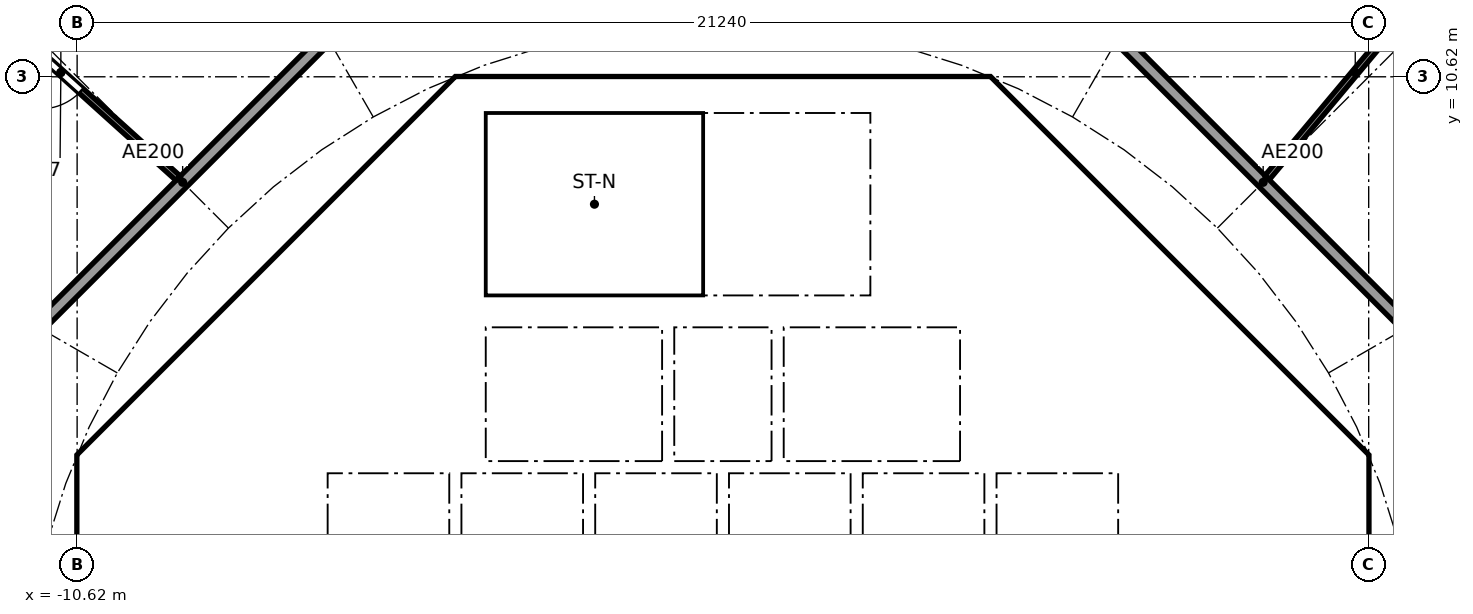
"""IFC4 building model, lengths in metres.
Left out: names, types, materials, properties, quantities, classifications, styles, units other than length and angle.
Written with IfcOpenShell. Run it as: python <this file> out.ifc"""

import sys

from ifc_helpers import new_model, si_unit, direction, frame, frame_2d, origin, place, context, subcontext, project, spatial, polyline, rectangle, outline, extrude, element, fill, save


model = new_model("IFC4")
c1 = context("Model", 3, precision=1e-05, world=origin(), true_north=direction((0.0, 1.0)))
c2 = subcontext(c1, "Body", "Model", "MODEL_VIEW")
j1 = project(units=[si_unit("LENGTHUNIT", "METRE"), si_unit("PLANEANGLEUNIT", "RADIAN")], contexts=[c1])
p1 = place(None, origin())
s1 = spatial("IfcSite", under=j1, at=p1, CompositionType="ELEMENT")
p2 = place(p1, origin())
s2 = spatial("IfcBuilding", under=s1, at=p2, CompositionType="ELEMENT")
p3 = place(p2, frame((0.0, 0.0, 91.8)))
s3 = spatial("IfcBuildingStorey", under=s2, at=p3, CompositionType="ELEMENT", Elevation=91.8)
p4 = place(p3, frame((9.988, 4.613, 0.0), z_axis=(0.0, 0.0, 1.0), x_axis=(-0.707106781187, 0.707106781187, 0.0)))
e1 = element("IfcWall", 1, at=p4, inside=s3, PredefinedType="SHEAR", context=c2, shape_type="SweptSolid", body=[
    extrude(rectangle(XDim=7.602, YDim=0.6, at=frame_2d((3.801, 0.0))), origin(), (0.0, 0.0, 1.0), 3.44),
])
p5 = place(p4, frame((3.201, 0.0, 0.0)))
e2 = element("IfcOpeningElement", 2, at=p5, cuts=e1, PredefinedType="OPENING", context=c2, shape_type="SweptSolid", body=[
    extrude(rectangle(XDim=1.2, YDim=2.1, at=frame_2d((0.6, 1.05))), frame((0.0, 0.31, 0.0), z_axis=(0.0, -1.0, 0.0), x_axis=(1.0, 0.0, 0.0)), (0.0, 0.0, 1.0), 0.62),
])
p6 = place(p3, frame((-4.613, 9.988, 0.0), z_axis=(0.0, 0.0, 1.0), x_axis=(-0.707106781187, -0.707106781187, 0.0)))
e3 = element("IfcWall", 3, at=p6, inside=s3, PredefinedType="SHEAR", context=c2, shape_type="SweptSolid", body=[
    extrude(rectangle(XDim=7.602, YDim=0.6, at=frame_2d((3.801, 0.0))), origin(), (0.0, 0.0, 1.0), 3.44),
])
p7 = place(p6, frame((0.351, 0.0, 0.0)))
e4 = element("IfcOpeningElement", 4, at=p7, cuts=e3, PredefinedType="OPENING", context=c2, shape_type="SweptSolid", body=[
    extrude(rectangle(XDim=1.1, YDim=2.1, at=frame_2d((0.55, 1.05))), frame((0.0, 0.31, 0.0), z_axis=(0.0, -1.0, 0.0), x_axis=(1.0, 0.0, 0.0)), (0.0, 0.0, 1.0), 0.62),
])
p8 = place(p3, frame((-10.325, 3.801, 0.0), z_axis=(0.0, 0.0, 1.0), x_axis=(0.0, -1.0, 0.0)))
e5 = element("IfcWall", 5, at=p8, inside=s3, PredefinedType="SHEAR", context=c2, shape_type="SweptSolid", body=[
    extrude(rectangle(XDim=7.602, YDim=0.6, at=frame_2d((3.801, 0.0))), origin(), (0.0, 0.0, 1.0), 3.44),
])
p9 = place(p8, frame((0.651, 0.0, 0.0)))
e6 = element("IfcOpeningElement", 6, at=p9, cuts=e5, PredefinedType="OPENING", context=c2, shape_type="SweptSolid", body=[
    extrude(rectangle(XDim=1.5, YDim=2.1, at=frame_2d((0.75, 1.05))), frame((0.0, 0.31, 0.0), z_axis=(0.0, -1.0, 0.0), x_axis=(1.0, 0.0, 0.0)), (0.0, 0.0, 1.0), 0.62),
])
p10 = place(p8, frame((5.451, 0.0, 0.0)))
e7 = element("IfcOpeningElement", 7, at=p10, cuts=e5, PredefinedType="OPENING", context=c2, shape_type="SweptSolid", body=[
    extrude(rectangle(XDim=1.5, YDim=2.1, at=frame_2d((0.75, 1.05))), frame((0.0, 0.31, 0.0), z_axis=(0.0, -1.0, 0.0), x_axis=(1.0, 0.0, 0.0)), (0.0, 0.0, 1.0), 0.62),
])
p11 = place(p3, frame((-7.0, 4.1, 0.0), z_axis=(0.0, 0.0, 1.0), x_axis=(0.0, 1.0, 0.0)))
e8 = element("IfcWall", 8, at=p11, inside=s3, PredefinedType="PARTITIONING", context=c2, shape_type="SweptSolid", body=[
    extrude(rectangle(XDim=2.927, YDim=0.15, at=frame_2d((1.463, 0.0))), origin(), (0.0, 0.0, 1.0), 3.44),
])
p12 = place(p11, frame((1.051, 0.0, 0.0)))
e9 = element("IfcOpeningElement", 9, at=p12, cuts=e8, PredefinedType="OPENING", context=c2, shape_type="SweptSolid", body=[
    extrude(rectangle(XDim=0.9, YDim=2.1, at=frame_2d((0.45, 1.05))), frame((0.0, 0.085, 0.0), z_axis=(0.0, -1.0, 0.0), x_axis=(1.0, 0.0, 0.0)), (0.0, 0.0, 1.0), 0.17),
])
p13 = place(p3, frame((4.0, 4.3, 0.0), z_axis=(0.0, 0.0, 1.0), x_axis=(0.0, 1.0, 0.0)))
e10 = element("IfcWall", 10, at=p13, inside=s3, PredefinedType="SOLIDWALL", context=c2, shape_type="SweptSolid", body=[
    extrude(rectangle(XDim=2.2, YDim=0.2, at=frame_2d((1.1, 0.0))), origin(), (0.0, 0.0, 1.0), 3.44),
])
p14 = place(p13, frame((0.55, 0.0, 0.0)))
e11 = element("IfcOpeningElement", 11, at=p14, cuts=e10, PredefinedType="OPENING", context=c2, shape_type="SweptSolid", body=[
    extrude(rectangle(XDim=1.1, YDim=2.1, at=frame_2d((0.55, 1.05))), frame((0.0, 0.11, 0.0), z_axis=(0.0, -1.0, 0.0), x_axis=(1.0, 0.0, 0.0)), (0.0, 0.0, 1.0), 0.22),
])
p15 = place(p3, frame((-4.0, 4.3, 0.0), z_axis=(0.0, 0.0, 1.0), x_axis=(0.0, 1.0, 0.0)))
e12 = element("IfcWall", 12, at=p15, inside=s3, PredefinedType="SOLIDWALL", context=c2, shape_type="SweptSolid", body=[
    extrude(rectangle(XDim=2.2, YDim=0.2, at=frame_2d((1.1, 0.0))), origin(), (0.0, 0.0, 1.0), 3.44),
])
p16 = place(p15, frame((0.55, 0.0, 0.0)))
e13 = element("IfcOpeningElement", 13, at=p16, cuts=e12, PredefinedType="OPENING", context=c2, shape_type="SweptSolid", body=[
    extrude(rectangle(XDim=1.1, YDim=2.1, at=frame_2d((0.55, 1.05))), frame((0.0, 0.11, 0.0), z_axis=(0.0, -1.0, 0.0), x_axis=(1.0, 0.0, 0.0)), (0.0, 0.0, 1.0), 0.22),
])
p17 = place(p3, frame((6.7, 4.0, 0.0), z_axis=(0.0, 0.0, 1.0), x_axis=(1.0, 0.0, 0.0)))
e14 = element("IfcWall", 14, at=p17, inside=s3, PredefinedType="SOLIDWALL", context=c2, shape_type="SweptSolid", body=[
    extrude(rectangle(XDim=3.325, YDim=0.2, at=frame_2d((1.662, 0.0))), origin(), (0.0, 0.0, 1.0), 3.44),
])
p18 = place(p17, frame((1.25, 0.0, 0.0)))
e15 = element("IfcOpeningElement", 15, at=p18, cuts=e14, PredefinedType="OPENING", context=c2, shape_type="SweptSolid", body=[
    extrude(rectangle(XDim=1.1, YDim=2.1, at=frame_2d((0.55, 1.05))), frame((0.0, 0.11, 0.0), z_axis=(0.0, -1.0, 0.0), x_axis=(1.0, 0.0, 0.0)), (0.0, 0.0, 1.0), 0.22),
])
p19 = place(p3, frame((4.0, 7.025, 0.0), z_axis=(0.0, 0.0, 1.0), x_axis=(0.0, 1.0, 0.0)))
e16 = element("IfcWall", 16, at=p19, inside=s3, PredefinedType="SOLIDWALL", context=c2, shape_type="SweptSolid", body=[
    extrude(rectangle(XDim=3.0, YDim=0.2, at=frame_2d((1.5, 0.0))), origin(), (0.0, 0.0, 1.0), 3.44),
])
p20 = place(p19, frame((0.925, 0.0, 0.0)))
e17 = element("IfcOpeningElement", 17, at=p20, cuts=e16, PredefinedType="OPENING", context=c2, shape_type="SweptSolid", body=[
    extrude(rectangle(XDim=1.1, YDim=2.1, at=frame_2d((0.55, 1.05))), frame((0.0, 0.11, 0.0), z_axis=(0.0, -1.0, 0.0), x_axis=(1.0, 0.0, 0.0)), (0.0, 0.0, 1.0), 0.22),
])
p21 = place(p3, origin())
e18 = element("IfcWall", 18, at=p21, inside=s3, PredefinedType="SHEAR", context=c2, shape_type="SweptSolid", body=[
    extrude(outline(polyline([(-10.2, 4.825), (-9.776, 4.401), (-10.025, 4.152), (-10.025, 3.801), (-10.625, 3.801), (-10.625, 4.401), (-10.2, 4.825)])), origin(), (0.0, 0.0, 1.0), 3.44),
])
p22 = place(p3, origin())
e19 = element("IfcWall", 19, at=p22, inside=s3, PredefinedType="SHEAR", context=c2, shape_type="SweptSolid", body=[
    extrude(outline(polyline([(-4.152, 10.025), (-4.401, 9.776), (-4.825, 10.2), (-4.401, 10.625), (4.401, 10.625), (4.825, 10.2), (4.401, 9.776), (4.152, 10.025), (-4.152, 10.025)])), origin(), (0.0, 0.0, 1.0), 3.44),
])
p23 = place(p3, origin())
e20 = element("IfcWall", 20, at=p23, inside=s3, PredefinedType="SHEAR", context=c2, shape_type="SweptSolid", body=[
    extrude(outline(polyline([(9.776, -4.401), (10.025, -4.152), (10.025, -3.801), (10.025, 4.152), (9.776, 4.401), (10.2, 4.825), (10.625, 4.401), (10.625, -4.401), (10.2, -4.825), (9.776, -4.401)])), origin(), (0.0, 0.0, 1.0), 3.44),
])
for number, where, z_axis, x_axis in (
    (21, (-0.9, 4.3, 0.0), (0.0, 0.0, 1.0), (0.0, 1.0, 0.0)),
    (22, (0.9, 4.3, 0.0), (0.0, 0.0, 1.0), (0.0, 1.0, 0.0)),
):
    element("IfcWall", number, at=place(p3, frame(where, z_axis=z_axis, x_axis=x_axis)), inside=s3, PredefinedType="SOLIDWALL", context=c2, shape_type="SweptSolid", body=[
        extrude(rectangle(XDim=2.2, YDim=0.2, at=frame_2d((1.1, 0.0))), origin(), (0.0, 0.0, 1.0), 3.44),
    ])
p24 = place(p3, origin())
e23 = element("IfcWall", 23, at=p24, inside=s3, PredefinedType="SOLIDWALL", context=c2, shape_type="SweptSolid", body=[
    extrude(outline(polyline([(-6.5, 2.1), (-6.7, 2.1), (-6.7, 4.3), (6.7, 4.3), (6.7, 2.1), (6.5, 2.1), (6.5, 4.1), (4.5, 4.1), (4.5, 2.1), (4.3, 2.1), (4.3, 4.1), (2.3, 4.1), (2.3, 2.1), (2.1, 2.1), (2.1, 4.1), (0.1, 4.1), (0.1, 2.1), (-0.1, 2.1), (-0.1, 4.1), (-2.1, 4.1), (-2.1, 2.1), (-2.3, 2.1), (-2.3, 4.1), (-4.3, 4.1), (-4.3, 2.1), (-4.5, 2.1), (-4.5, 4.1), (-6.5, 4.1), (-6.5, 2.1)])), origin(), (0.0, 0.0, 1.0), 3.44),
])
p25 = place(p3, frame((-10.025, 4.0, 0.0), z_axis=(0.0, 0.0, 1.0), x_axis=(1.0, 0.0, 0.0)))
e24 = element("IfcWall", 24, at=p25, inside=s3, PredefinedType="PARTITIONING", context=c2, shape_type="SweptSolid", body=[
    extrude(rectangle(XDim=3.325, YDim=0.2, at=frame_2d((1.662, 0.0))), origin(), (0.0, 0.0, 1.0), 3.44),
])
p26 = place(p3, origin())
e25 = element("IfcWall", 25, at=p26, inside=s3, PredefinedType="SOLIDWALL", context=c2, shape_type="SweptSolid", body=[
    extrude(outline(polyline([(-3.9, 7.025), (-4.1, 7.025), (-4.1, 10.025), (-3.9, 10.025), (-3.9, 7.025)])), origin(), (0.0, 0.0, 1.0), 3.44),
])
p27 = place(p3, origin())
e26 = element("IfcWall", 26, at=p27, inside=s3, PredefinedType="SOLIDWALL", context=c2, shape_type="SweptSolid", body=[
    extrude(outline(polyline([(4.1, 6.5), (-4.1, 6.5), (-4.1, 7.025), (4.1, 7.025), (4.1, 6.5)])), origin(), (0.0, 0.0, 1.0), 3.44),
])
p28 = place(p3, origin())
e27 = element("IfcWall", 27, at=p28, inside=s3, PredefinedType="SOLIDWALL", context=c2, shape_type="SweptSolid", body=[
    extrude(outline(polyline([(7.025, -3.9), (6.7, -3.9), (6.7, 3.9), (7.025, 3.9), (7.025, -3.9)])), origin(), (0.0, 0.0, 1.0), 3.44),
])
p29 = place(p3, frame((12.635, 5.134, 0.0), z_axis=(0.0, 0.0, 1.0), x_axis=(-0.707106781187, 0.707106781187, 0.0)))
e28 = element("IfcWall", 28, at=p29, inside=s3, PredefinedType="PARTITIONING", context=c2, shape_type="SweptSolid", body=[
    extrude(rectangle(XDim=10.609, YDim=0.2, at=frame_2d((5.305, 0.0))), origin(), (0.0, 0.0, 1.0), 3.44),
])
p30 = place(p3, frame((-5.275, 12.494, 0.0), z_axis=(0.0, 0.0, 1.0), x_axis=(-0.707106781187, -0.707106781187, 0.0)))
e29 = element("IfcWall", 29, at=p30, inside=s3, PredefinedType="PARTITIONING", context=c2, shape_type="SweptSolid", body=[
    extrude(rectangle(XDim=10.209, YDim=0.2, at=frame_2d((5.104, 0.0))), origin(), (0.0, 0.0, 1.0), 3.44),
])
p31 = place(p3, frame((13.339, 10.725, 0.0), z_axis=(0.0, 0.0, 1.0), x_axis=(-0.642515455924, 0.766272724882, 0.0)))
e30 = element("IfcWall", 30, at=p31, inside=s3, PredefinedType="PARTITIONING", context=c2, shape_type="SweptSolid", body=[
    extrude(rectangle(XDim=4.537, YDim=0.1, at=frame_2d((2.269, 0.0))), origin(), (0.0, 0.0, 1.0), 2.762),
])
p32 = place(p3, frame((8.949, 8.961, 0.0), z_axis=(0.0, 0.0, 1.0), x_axis=(0.642048217601, 0.766664259162, 0.0)))
e31 = element("IfcWall", 31, at=p32, inside=s3, PredefinedType="PARTITIONING", context=c2, shape_type="SweptSolid", body=[
    extrude(rectangle(XDim=4.518, YDim=0.1, at=frame_2d((2.259, 0.0))), origin(), (0.0, 0.0, 1.0), 2.687),
])
p33 = place(p3, frame((-8.959, 8.952, 0.0), z_axis=(0.0, 0.0, 1.0), x_axis=(-0.742686144764, 0.669639672045, 0.0)))
e32 = element("IfcWall", 32, at=p33, inside=s3, PredefinedType="PARTITIONING", context=c2, shape_type="SweptSolid", body=[
    extrude(rectangle(XDim=5.194, YDim=0.1, at=frame_2d((2.597, 0.0))), origin(), (0.0, 0.0, 1.0), 2.687),
])
p34 = place(p33, frame((2.147, 0.0, 0.0)))
e33 = element("IfcOpeningElement", 33, at=p34, cuts=e32, PredefinedType="OPENING", context=c2, shape_type="SweptSolid", body=[
    extrude(rectangle(XDim=0.9, YDim=2.1, at=frame_2d((0.45, 1.05))), frame((0.0, 0.06, 0.0), z_axis=(0.0, -1.0, 0.0), x_axis=(1.0, 0.0, 0.0)), (0.0, 0.0, 1.0), 0.12),
])
p35 = place(p14, origin())
e34 = element("IfcDoor", 34, at=p35, inside=s3, OperationType="DOUBLE_DOOR_SLIDING", PredefinedType="DOOR", context=c2, shape_type="SweptSolid", body=[
    extrude(rectangle(XDim=1.1, YDim=2.1, at=frame_2d((0.55, 1.05))), frame((0.0, 0.025, 0.0), z_axis=(0.0, -1.0, 0.0), x_axis=(1.0, 0.0, 0.0)), (0.0, 0.0, 1.0), 0.05),
])
fill(e11, e34)
p36 = place(p16, origin())
e35 = element("IfcDoor", 35, at=p36, inside=s3, OperationType="DOUBLE_DOOR_SLIDING", PredefinedType="DOOR", context=c2, shape_type="SweptSolid", body=[
    extrude(rectangle(XDim=1.1, YDim=2.1, at=frame_2d((0.55, 1.05))), frame((0.0, 0.025, 0.0), z_axis=(0.0, -1.0, 0.0), x_axis=(1.0, 0.0, 0.0)), (0.0, 0.0, 1.0), 0.05),
])
fill(e13, e35)
p37 = place(p18, frame((1.1, 0.0, 0.0), x_axis=(-1.0, 0.0, 0.0)))
e36 = element("IfcDoor", 36, at=p37, inside=s3, OperationType="SINGLE_SWING_RIGHT", PredefinedType="DOOR", context=c2, shape_type="SweptSolid", body=[
    extrude(rectangle(XDim=1.1, YDim=2.1, at=frame_2d((0.55, 1.05))), frame((0.0, 0.025, 0.0), z_axis=(0.0, -1.0, 0.0), x_axis=(1.0, 0.0, 0.0)), (0.0, 0.0, 1.0), 0.05),
])
fill(e15, e36)
p38 = place(p20, origin())
e37 = element("IfcDoor", 37, at=p38, inside=s3, OperationType="SINGLE_SWING_LEFT", PredefinedType="DOOR", context=c2, shape_type="SweptSolid", body=[
    extrude(rectangle(XDim=1.1, YDim=2.1, at=frame_2d((0.55, 1.05))), frame((0.0, 0.025, 0.0), z_axis=(0.0, -1.0, 0.0), x_axis=(1.0, 0.0, 0.0)), (0.0, 0.0, 1.0), 0.05),
])
fill(e17, e37)
p39 = place(p12, origin())
e38 = element("IfcDoor", 38, at=p39, inside=s3, OperationType="SINGLE_SWING_RIGHT", PredefinedType="DOOR", context=c2, shape_type="SweptSolid", body=[
    extrude(rectangle(XDim=0.9, YDim=2.1, at=frame_2d((0.45, 1.05))), frame((0.0, 0.025, 0.0), z_axis=(0.0, -1.0, 0.0), x_axis=(1.0, 0.0, 0.0)), (0.0, 0.0, 1.0), 0.05),
])
fill(e9, e38)
p40 = place(p5, origin())
e39 = element("IfcDoor", 39, at=p40, inside=s3, OperationType="SINGLE_SWING_RIGHT", PredefinedType="DOOR", context=c2, shape_type="SweptSolid", body=[
    extrude(rectangle(XDim=1.2, YDim=2.1, at=frame_2d((0.6, 1.05))), frame((0.0, 0.025, 0.0), z_axis=(0.0, -1.0, 0.0), x_axis=(1.0, 0.0, 0.0)), (0.0, 0.0, 1.0), 0.05),
])
fill(e2, e39)
p41 = place(p9, origin())
e40 = element("IfcDoor", 40, at=p41, inside=s3, OperationType="DOUBLE_DOOR_SINGLE_SWING", PredefinedType="DOOR", context=c2, shape_type="SweptSolid", body=[
    extrude(rectangle(XDim=1.5, YDim=2.1, at=frame_2d((0.75, 1.05))), frame((0.0, 0.025, 0.0), z_axis=(0.0, -1.0, 0.0), x_axis=(1.0, 0.0, 0.0)), (0.0, 0.0, 1.0), 0.05),
])
fill(e6, e40)
p42 = place(p7, origin())
e41 = element("IfcDoor", 41, at=p42, inside=s3, OperationType="SINGLE_SWING_RIGHT", PredefinedType="DOOR", context=c2, shape_type="SweptSolid", body=[
    extrude(rectangle(XDim=1.1, YDim=2.1, at=frame_2d((0.55, 1.05))), frame((0.0, 0.025, 0.0), z_axis=(0.0, -1.0, 0.0), x_axis=(1.0, 0.0, 0.0)), (0.0, 0.0, 1.0), 0.05),
])
fill(e4, e41)
p43 = place(p34, origin())
e42 = element("IfcDoor", 42, at=p43, inside=s3, OperationType="SINGLE_SWING_RIGHT", PredefinedType="DOOR", context=c2, shape_type="SweptSolid", body=[
    extrude(rectangle(XDim=0.9, YDim=2.1, at=frame_2d((0.45, 1.05))), frame((0.0, 0.025, 0.0), z_axis=(0.0, -1.0, 0.0), x_axis=(1.0, 0.0, 0.0)), (0.0, 0.0, 1.0), 0.05),
])
fill(e33, e42)
save(model, sys.argv[1])
